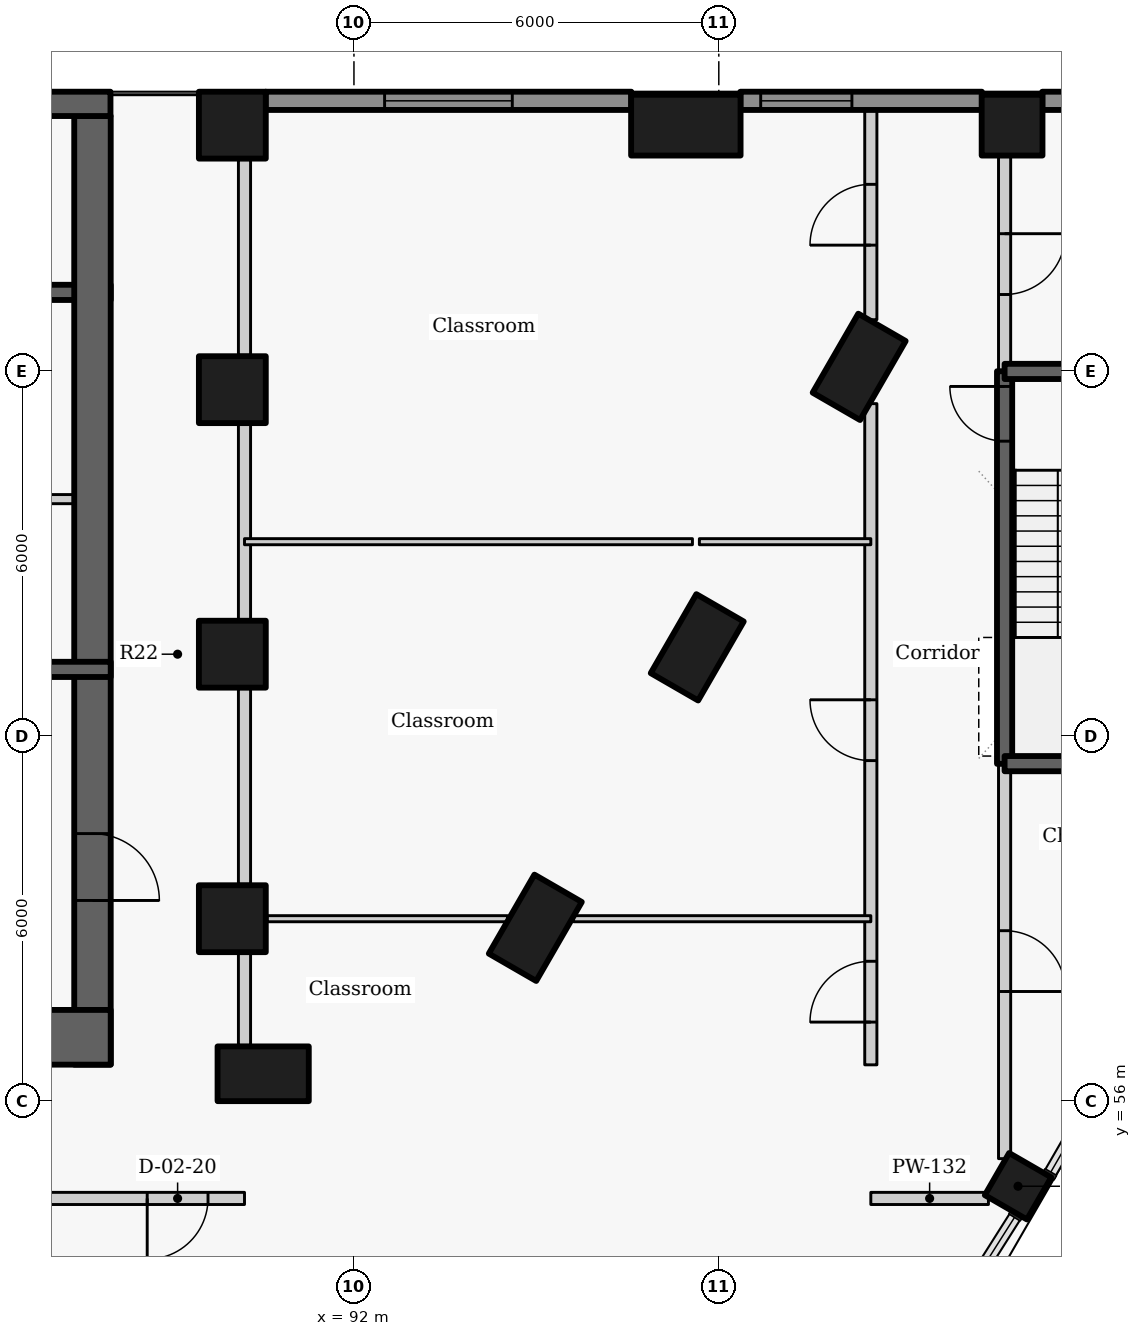
"""IFC4 building model, lengths in metres.
Left out: names, types, materials, properties, quantities, classifications, styles, units other than length and angle.
Written with IfcOpenShell. Run it as: python <this file> out.ifc"""

import sys

from ifc_helpers import new_model, si_unit, direction, frame, frame_2d, origin, origin_2d, place, context, subcontext, project, spatial, rectangle, extrude, element, fill, save


model = new_model("IFC4")
c1 = context("Model", 3, precision=1e-05, world=origin(), true_north=direction((0.0, 1.0)))
c2 = subcontext(c1, "Body", "Model", "MODEL_VIEW")
j1 = project(units=[si_unit("LENGTHUNIT", "METRE"), si_unit("PLANEANGLEUNIT", "RADIAN")], contexts=[c1])
p1 = place(None, origin())
s1 = spatial("IfcSite", under=j1, at=p1, CompositionType="ELEMENT")
p2 = place(p1, origin())
s2 = spatial("IfcBuilding", under=s1, at=p2, CompositionType="ELEMENT")
p3 = place(p2, frame((0.0, 0.0, 19.8)))
s3 = spatial("IfcBuildingStorey", under=s2, at=p3, CompositionType="ELEMENT", Elevation=19.8)
for number, where, z_axis, x_axis in (
    (1, (90.507, 56.45, 0.0), (0.0, 0.0, 1.0), (1.0, 0.0, 0.0)),
    (2, (94.982, 58.851, 0.0), (0.0, 0.0, 1.0), (0.5, 0.866, 0.0)),
    (3, (97.646, 63.463, 0.0), (0.0, 0.0, 1.0), (0.5, 0.866, 0.0)),
    (4, (100.308, 68.075, 0.0), (0.0, 0.0, 1.0), (0.5, 0.866, 0.0)),
):
    element("IfcColumn", number, at=place(p3, frame(where, z_axis=z_axis, x_axis=x_axis)), inside=s3, PredefinedType="COLUMN", context=c2, shape_type="SweptSolid", body=[
        extrude(rectangle(XDim=1.5, YDim=0.9, at=origin_2d()), origin(), (0.0, 0.0, 1.0), 4.2),
    ])
for number, where, z_axis, x_axis in (
    (5, (90.0, 59.0, 0.0), (0.0, 0.0, 1.0), (0.0, 1.0, 0.0)),
    (6, (90.0, 63.35, 0.0), (0.0, 0.0, 1.0), (0.0, 1.0, 0.0)),
    (7, (90.0, 67.7, 0.0), (0.0, 0.0, 1.0), (0.0, 1.0, 0.0)),
    (8, (90.0, 72.05, 0.0), (0.0, 0.0, 1.0), (0.0, 1.0, 0.0)),
):
    element("IfcColumn", number, at=place(p3, frame(where, z_axis=z_axis, x_axis=x_axis)), inside=s3, PredefinedType="COLUMN", context=c2, shape_type="SweptSolid", body=[
        extrude(rectangle(XDim=1.1, YDim=1.1, at=origin_2d()), origin(), (0.0, 0.0, 1.0), 4.2),
    ])
p4 = place(p3, frame((102.921, 54.6, 0.0), z_axis=(0.0, 0.0, 1.0), x_axis=(0.5, 0.866025403784, 0.0)))
e9 = element("IfcColumn", 9, at=p4, inside=s3, PredefinedType="COLUMN", context=c2, shape_type="SweptSolid", body=[
    extrude(rectangle(XDim=0.8, YDim=0.8, at=origin_2d()), origin(), (0.0, 0.0, 1.0), 4.2),
])
p5 = place(p3, frame((97.458, 72.05, 0.0), z_axis=(0.0, 0.0, 1.0), x_axis=(1.0, 0.0, 0.0)))
e10 = element("IfcColumn", 10, at=p5, inside=s3, PredefinedType="COLUMN", context=c2, shape_type="SweptSolid", body=[
    extrude(rectangle(XDim=1.8, YDim=1.0, at=origin_2d()), origin(), (0.0, 0.0, 1.0), 4.2),
])
p6 = place(p3, frame((102.823, 72.05, 0.0), z_axis=(0.0, 0.0, 1.0), x_axis=(1.0, 0.0, 0.0)))
e11 = element("IfcColumn", 11, at=p6, inside=s3, PredefinedType="COLUMN", context=c2, shape_type="SweptSolid", body=[
    extrude(rectangle(XDim=1.0, YDim=1.0, at=origin_2d()), origin(), (0.0, 0.0, 1.0), 4.2),
])
p7 = place(p3, frame((107.413, 72.45, 0.0), z_axis=(0.0, 0.0, 1.0), x_axis=(-1.0, 0.0, 0.0)))
e12 = element("IfcWall", 12, at=p7, inside=s3, PredefinedType="SOLIDWALL", context=c2, shape_type="SweptSolid", body=[
    extrude(rectangle(XDim=4.094, YDim=0.3, at=frame_2d((2.047, 0.0))), origin(), (0.0, 0.0, 1.0), 3.0),
])
p8 = place(p7, frame((0.997, 0.0, 0.9)))
e13 = element("IfcOpeningElement", 13, at=p8, cuts=e12, PredefinedType="OPENING", context=c2, shape_type="SweptSolid", body=[
    extrude(rectangle(XDim=2.1, YDim=2.05, at=frame_2d((1.05, 1.025))), frame((0.0, 0.16, 0.0), z_axis=(0.0, -1.0, 0.0), x_axis=(1.0, 0.0, 0.0)), (0.0, 0.0, 1.0), 0.32),
])
p9 = place(p3, frame((102.327, 72.45, 0.0), z_axis=(0.0, 0.0, 1.0), x_axis=(-1.0, 0.0, 0.0)))
e14 = element("IfcWall", 14, at=p9, inside=s3, PredefinedType="SOLIDWALL", context=c2, shape_type="SweptSolid", body=[
    extrude(rectangle(XDim=3.973, YDim=0.3, at=frame_2d((1.986, 0.0))), origin(), (0.0, 0.0, 1.0), 3.0),
])
p10 = place(p9, frame((2.138, 0.0, 0.9)))
e15 = element("IfcOpeningElement", 15, at=p10, cuts=e14, PredefinedType="OPENING", context=c2, shape_type="SweptSolid", body=[
    extrude(rectangle(XDim=1.5, YDim=2.05, at=frame_2d((0.75, 1.025))), frame((0.0, 0.16, 0.0), z_axis=(0.0, -1.0, 0.0), x_axis=(1.0, 0.0, 0.0)), (0.0, 0.0, 1.0), 0.32),
])
p11 = place(p3, frame((96.562, 72.45, 0.0), z_axis=(0.0, 0.0, 1.0), x_axis=(-1.0, 0.0, 0.0)))
e16 = element("IfcWall", 16, at=p11, inside=s3, PredefinedType="SOLIDWALL", context=c2, shape_type="SweptSolid", body=[
    extrude(rectangle(XDim=6.016, YDim=0.3, at=frame_2d((3.008, 0.0))), origin(), (0.0, 0.0, 1.0), 3.0),
])
p12 = place(p11, frame((1.958, 0.0, 0.9)))
e17 = element("IfcOpeningElement", 17, at=p12, cuts=e16, PredefinedType="OPENING", context=c2, shape_type="SweptSolid", body=[
    extrude(rectangle(XDim=2.1, YDim=2.05, at=frame_2d((1.05, 1.025))), frame((0.0, 0.16, 0.0), z_axis=(0.0, -1.0, 0.0), x_axis=(1.0, 0.0, 0.0)), (0.0, 0.0, 1.0), 0.32),
])
p13 = place(p3, frame((85.4, 69.3, -0.3), z_axis=(0.0, 0.0, 1.0), x_axis=(1.0, 0.0, 0.0)))
e18 = element("IfcWall", 18, at=p13, inside=s3, PredefinedType="SHEAR", context=c2, shape_type="SweptSolid", body=[
    extrude(rectangle(XDim=2.6, YDim=0.25, at=frame_2d((1.3, 0.0))), origin(), (0.0, 0.0, 1.0), 4.2),
])
p14 = place(p13, frame((0.525, 0.0, 0.3)))
e19 = element("IfcOpeningElement", 19, at=p14, cuts=e18, PredefinedType="OPENING", context=c2, shape_type="SweptSolid", body=[
    extrude(rectangle(XDim=0.9, YDim=2.1, at=frame_2d((0.45, 1.05))), frame((0.0, 0.135, 0.0), z_axis=(0.0, -1.0, 0.0), x_axis=(1.0, 0.0, 0.0)), (0.0, 0.0, 1.0), 0.27),
])
p15 = place(p3, frame((87.7, 72.2, -0.3), z_axis=(0.0, 0.0, 1.0), x_axis=(0.0, -1.0, 0.0)))
e20 = element("IfcWall", 20, at=p15, inside=s3, PredefinedType="SHEAR", context=c2, shape_type="SweptSolid", body=[
    extrude(rectangle(XDim=15.6, YDim=0.6, at=frame_2d((7.8, 0.0))), origin(), (0.0, 0.0, 1.0), 4.2),
])
p16 = place(p15, frame((11.8, 0.0, 0.3)))
e21 = element("IfcOpeningElement", 21, at=p16, cuts=e20, PredefinedType="OPENING", context=c2, shape_type="SweptSolid", body=[
    extrude(rectangle(XDim=1.1, YDim=2.1, at=frame_2d((0.55, 1.05))), frame((0.0, 0.31, 0.0), z_axis=(0.0, -1.0, 0.0), x_axis=(1.0, 0.0, 0.0)), (0.0, 0.0, 1.0), 0.62),
])
p17 = place(p3, frame((88.0, 65.9, 0.0), z_axis=(0.0, 0.0, 1.0), x_axis=(-1.0, 0.0, 0.0)))
e22 = element("IfcWall", 22, at=p17, inside=s3, PredefinedType="PARTITIONING", context=c2, shape_type="SweptSolid", body=[
    extrude(rectangle(XDim=2.603, YDim=0.15, at=frame_2d((1.302, 0.0))), origin(), (0.0, 0.0, 1.0), 3.9),
])
p18 = place(p17, frame((1.175, 0.0, 0.0)))
e23 = element("IfcOpeningElement", 23, at=p18, cuts=e22, PredefinedType="OPENING", context=c2, shape_type="SweptSolid", body=[
    extrude(rectangle(XDim=0.9, YDim=2.1, at=frame_2d((0.45, 1.05))), frame((0.0, 0.085, 0.0), z_axis=(0.0, -1.0, 0.0), x_axis=(1.0, 0.0, 0.0)), (0.0, 0.0, 1.0), 0.17),
])
p19 = place(p3, frame((80.0, 63.1, -0.3), z_axis=(0.0, 0.0, 1.0), x_axis=(1.0, 0.0, 0.0)))
e24 = element("IfcWall", 24, at=p19, inside=s3, PredefinedType="SHEAR", context=c2, shape_type="SweptSolid", body=[
    extrude(rectangle(XDim=8.0, YDim=0.25, at=frame_2d((4.0, 0.0))), origin(), (0.0, 0.0, 1.0), 4.2),
])
p20 = place(p19, frame((3.849, 0.0, 0.3)))
e25 = element("IfcOpeningElement", 25, at=p20, cuts=e24, PredefinedType="OPENING", context=c2, shape_type="SweptSolid", body=[
    extrude(rectangle(XDim=1.1, YDim=2.1, at=frame_2d((0.55, 1.05))), frame((0.0, 0.135, 0.0), z_axis=(0.0, -1.0, 0.0), x_axis=(1.0, 0.0, 0.0)), (0.0, 0.0, 1.0), 0.27),
])
p21 = place(p3, frame((88.0, 57.05, -0.3), z_axis=(0.0, 0.0, 1.0), x_axis=(-1.0, 0.0, 0.0)))
e26 = element("IfcWall", 26, at=p21, inside=s3, PredefinedType="SHEAR", context=c2, shape_type="SweptSolid", body=[
    extrude(rectangle(XDim=4.6, YDim=0.9, at=frame_2d((2.3, 0.0))), origin(), (0.0, 0.0, 1.0), 4.2),
])
p22 = place(p21, frame((1.752, 0.0, 0.3)))
e27 = element("IfcOpeningElement", 27, at=p22, cuts=e26, PredefinedType="OPENING", context=c2, shape_type="SweptSolid", body=[
    extrude(rectangle(XDim=1.1, YDim=2.1, at=frame_2d((0.55, 1.05))), frame((0.0, 0.46, 0.0), z_axis=(0.0, -1.0, 0.0), x_axis=(1.0, 0.0, 0.0)), (0.0, 0.0, 1.0), 0.92),
])
p23 = place(p3, frame((102.7, 61.547, -0.3), z_axis=(0.0, 0.0, 1.0), x_axis=(0.0, 1.0, 0.0)))
e28 = element("IfcWall", 28, at=p23, inside=s3, PredefinedType="SHEAR", context=c2, shape_type="SweptSolid", body=[
    extrude(rectangle(XDim=6.456, YDim=0.25, at=frame_2d((3.228, 0.0))), origin(), (0.0, 0.0, 1.0), 4.2),
])
p24 = place(p23, frame((5.306, 0.0, 0.3)))
e29 = element("IfcOpeningElement", 29, at=p24, cuts=e28, PredefinedType="OPENING", context=c2, shape_type="SweptSolid", body=[
    extrude(rectangle(XDim=0.9, YDim=2.1, at=frame_2d((0.45, 1.05))), frame((0.0, 0.135, 0.0), z_axis=(0.0, -1.0, 0.0), x_axis=(1.0, 0.0, 0.0)), (0.0, 0.0, 1.0), 0.27),
])
p25 = place(p3, frame((102.7, 61.553, 0.0), z_axis=(0.0, 0.0, 1.0), x_axis=(0.0, -1.0, 0.0)))
e30 = element("IfcWall", 30, at=p25, inside=s3, PredefinedType="PARTITIONING", context=c2, shape_type="SweptSolid", body=[
    extrude(rectangle(XDim=6.499, YDim=0.2, at=frame_2d((3.249, 0.0))), origin(), (0.0, 0.0, 1.0), 3.9),
])
p26 = place(p25, frame((2.75, 0.0, 0.0)))
e31 = element("IfcOpeningElement", 31, at=p26, cuts=e30, PredefinedType="OPENING", context=c2, shape_type="SweptSolid", body=[
    extrude(rectangle(XDim=1.0, YDim=2.1, at=frame_2d((0.5, 1.05))), frame((0.0, 0.11, 0.0), z_axis=(0.0, -1.0, 0.0), x_axis=(1.0, 0.0, 0.0)), (0.0, 0.0, 1.0), 0.22),
])
p27 = place(p3, frame((102.7, 71.533, 0.0), z_axis=(0.0, 0.0, 1.0), x_axis=(0.0, -1.0, 0.0)))
e32 = element("IfcWall", 32, at=p27, inside=s3, PredefinedType="PARTITIONING", context=c2, shape_type="SweptSolid", body=[
    extrude(rectangle(XDim=3.536, YDim=0.2, at=frame_2d((1.768, 0.0))), origin(), (0.0, 0.0, 1.0), 3.9),
])
p28 = place(p27, frame((1.268, 0.0, 0.0)))
e33 = element("IfcOpeningElement", 33, at=p28, cuts=e32, PredefinedType="OPENING", context=c2, shape_type="SweptSolid", body=[
    extrude(rectangle(XDim=1.0, YDim=2.1, at=frame_2d((0.5, 1.05))), frame((0.0, 0.11, 0.0), z_axis=(0.0, -1.0, 0.0), x_axis=(1.0, 0.0, 0.0)), (0.0, 0.0, 1.0), 0.22),
])
p29 = place(p3, frame((100.5, 56.597, 0.0), z_axis=(0.0, 0.0, 1.0), x_axis=(0.0, 1.0, 0.0)))
e34 = element("IfcWall", 34, at=p29, inside=s3, PredefinedType="PARTITIONING", context=c2, shape_type="SweptSolid", body=[
    extrude(rectangle(XDim=10.873, YDim=0.2, at=frame_2d((5.437, 0.0))), origin(), (0.0, 0.0, 1.0), 3.9),
])
p30 = place(p29, frame((5.003, 0.0, 0.0)))
e35 = element("IfcOpeningElement", 35, at=p30, cuts=e34, PredefinedType="OPENING", context=c2, shape_type="SweptSolid", body=[
    extrude(rectangle(XDim=1.0, YDim=2.1, at=frame_2d((0.5, 1.05))), frame((0.0, 0.11, 0.0), z_axis=(0.0, -1.0, 0.0), x_axis=(1.0, 0.0, 0.0)), (0.0, 0.0, 1.0), 0.22),
])
p31 = place(p29, frame((0.703, 0.0, 0.0)))
e36 = element("IfcOpeningElement", 36, at=p31, cuts=e34, PredefinedType="OPENING", context=c2, shape_type="SweptSolid", body=[
    extrude(rectangle(XDim=1.0, YDim=2.1, at=frame_2d((0.5, 1.05))), frame((0.0, 0.11, 0.0), z_axis=(0.0, -1.0, 0.0), x_axis=(1.0, 0.0, 0.0)), (0.0, 0.0, 1.0), 0.22),
])
p32 = place(p3, frame((100.5, 68.851, 0.0), z_axis=(0.0, 0.0, 1.0), x_axis=(0.0, 1.0, 0.0)))
e37 = element("IfcWall", 37, at=p32, inside=s3, PredefinedType="PARTITIONING", context=c2, shape_type="SweptSolid", body=[
    extrude(rectangle(XDim=3.449, YDim=0.2, at=frame_2d((1.725, 0.0))), origin(), (0.0, 0.0, 1.0), 3.13),
])
p33 = place(p32, frame((1.226, 0.0, 0.0)))
e38 = element("IfcOpeningElement", 38, at=p33, cuts=e37, PredefinedType="OPENING", context=c2, shape_type="SweptSolid", body=[
    extrude(rectangle(XDim=1.0, YDim=2.1, at=frame_2d((0.5, 1.05))), frame((0.0, 0.11, 0.0), z_axis=(0.0, -1.0, 0.0), x_axis=(1.0, 0.0, 0.0)), (0.0, 0.0, 1.0), 0.22),
])
p34 = place(p3, frame((90.2, 56.917, 0.0), z_axis=(0.0, 0.0, 1.0), x_axis=(0.0, 1.0, 0.0)))
e39 = element("IfcWall", 39, at=p34, inside=s3, PredefinedType="PARTITIONING", context=c2, shape_type="SweptSolid", body=[
    extrude(rectangle(XDim=1.516, YDim=0.2, at=frame_2d((0.758, 0.0))), origin(), (0.0, 0.0, 1.0), 3.9),
])
for number, where, z_axis, x_axis in (
    (40, (90.2, 59.567, 0.0), (0.0, 0.0, 1.0), (0.0, 1.0, 0.0)),
    (41, (90.2, 63.917, 0.0), (0.0, 0.0, 1.0), (0.0, 1.0, 0.0)),
):
    element("IfcWall", number, at=place(p3, frame(where, z_axis=z_axis, x_axis=x_axis)), inside=s3, PredefinedType="PARTITIONING", context=c2, shape_type="SweptSolid", body=[
        extrude(rectangle(XDim=3.216, YDim=0.2, at=frame_2d((1.608, 0.0))), origin(), (0.0, 0.0, 1.0), 3.13),
    ])
p35 = place(p3, frame((90.2, 68.267, 0.0), z_axis=(0.0, 0.0, 1.0), x_axis=(0.0, 1.0, 0.0)))
e42 = element("IfcWall", 42, at=p35, inside=s3, PredefinedType="PARTITIONING", context=c2, shape_type="SweptSolid", body=[
    extrude(rectangle(XDim=3.216, YDim=0.2, at=frame_2d((1.608, 0.0))), origin(), (0.0, 0.0, 1.0), 3.13),
])
p36 = place(p3, frame((90.2, 54.4, 0.0), z_axis=(0.0, 0.0, 1.0), x_axis=(-1.0, 0.0, 0.0)))
e43 = element("IfcWall", 43, at=p36, inside=s3, PredefinedType="PARTITIONING", context=c2, shape_type="SweptSolid", body=[
    extrude(rectangle(XDim=20.4, YDim=0.2, at=frame_2d((10.2, 0.0))), origin(), (0.0, 0.0, 1.0), 3.9),
])
p37 = place(p36, frame((18.8, 0.0, 0.0)))
e44 = element("IfcOpeningElement", 44, at=p37, cuts=e43, PredefinedType="OPENING", context=c2, shape_type="SweptSolid", body=[
    extrude(rectangle(XDim=1.0, YDim=2.1, at=frame_2d((0.5, 1.05))), frame((0.0, 0.11, 0.0), z_axis=(0.0, -1.0, 0.0), x_axis=(1.0, 0.0, 0.0)), (0.0, 0.0, 1.0), 0.22),
])
p38 = place(p36, frame((0.6, 0.0, 0.0)))
e45 = element("IfcOpeningElement", 45, at=p38, cuts=e43, PredefinedType="OPENING", context=c2, shape_type="SweptSolid", body=[
    extrude(rectangle(XDim=1.0, YDim=2.1, at=frame_2d((0.5, 1.05))), frame((0.0, 0.11, 0.0), z_axis=(0.0, -1.0, 0.0), x_axis=(1.0, 0.0, 0.0)), (0.0, 0.0, 1.0), 0.22),
])
p39 = place(p36, frame((10.1, 0.0, 0.0)))
e46 = element("IfcOpeningElement", 46, at=p39, cuts=e43, PredefinedType="OPENING", context=c2, shape_type="SweptSolid", body=[
    extrude(rectangle(XDim=1.0, YDim=2.1, at=frame_2d((0.5, 1.05))), frame((0.0, 0.11, 0.0), z_axis=(0.0, -1.0, 0.0), x_axis=(1.0, 0.0, 0.0)), (0.0, 0.0, 1.0), 0.22),
])
p40 = place(p3, frame((100.5, 54.4, 0.0), z_axis=(0.0, 0.0, 1.0), x_axis=(1.0, 0.0, 0.0)))
e47 = element("IfcWall", 47, at=p40, inside=s3, PredefinedType="PARTITIONING", context=c2, shape_type="SweptSolid", body=[
    extrude(rectangle(XDim=1.934, YDim=0.2, at=frame_2d((0.967, 0.0))), origin(), (0.0, 0.0, 1.0), 3.9),
])
for number, where, z_axis, x_axis in (
    (48, (102.7, 68.0, -0.3), (0.0, 0.0, 1.0), (1.0, 0.0, 0.0)),
    (49, (102.7, 61.55, -0.3), (0.0, 0.0, 1.0), (1.0, 0.0, 0.0)),
):
    element("IfcWall", number, at=place(p3, frame(where, z_axis=z_axis, x_axis=x_axis)), inside=s3, PredefinedType="SHEAR", context=c2, shape_type="SweptSolid", body=[
        extrude(rectangle(XDim=3.45, YDim=0.25, at=frame_2d((1.725, 0.0))), origin(), (0.0, 0.0, 1.0), 4.2),
    ])
p41 = place(p3, frame((90.2, 65.2, 0.0), z_axis=(0.0, 0.0, 1.0), x_axis=(1.0, 0.0, 0.0)))
e50 = element("IfcWall", 50, at=p41, inside=s3, PredefinedType="PARTITIONING", context=c2, shape_type="SweptSolid", body=[
    extrude(rectangle(XDim=7.366, YDim=0.1, at=frame_2d((3.683, 0.0))), origin(), (0.0, 0.0, 1.0), 3.9),
])
p42 = place(p3, frame((97.68, 65.2, 0.0), z_axis=(0.0, 0.0, 1.0), x_axis=(1.0, 0.0, 0.0)))
e51 = element("IfcWall", 51, at=p42, inside=s3, PredefinedType="PARTITIONING", context=c2, shape_type="SweptSolid", body=[
    extrude(rectangle(XDim=2.82, YDim=0.1, at=frame_2d((1.41, 0.0))), origin(), (0.0, 0.0, 1.0), 2.98),
])
p43 = place(p3, frame((90.57, 59.0, 0.0), z_axis=(0.0, 0.0, 1.0), x_axis=(1.0, 0.0, 0.0)))
e52 = element("IfcWall", 52, at=p43, inside=s3, PredefinedType="PARTITIONING", context=c2, shape_type="SweptSolid", body=[
    extrude(rectangle(XDim=3.956, YDim=0.1, at=frame_2d((1.978, 0.0))), origin(), (0.0, 0.0, 1.0), 3.9),
])
p44 = place(p3, frame((95.612, 59.0, 0.0), z_axis=(0.0, 0.0, 1.0), x_axis=(1.0, 0.0, 0.0)))
e53 = element("IfcWall", 53, at=p44, inside=s3, PredefinedType="PARTITIONING", context=c2, shape_type="SweptSolid", body=[
    extrude(rectangle(XDim=4.888, YDim=0.1, at=frame_2d((2.444, 0.0))), origin(), (0.0, 0.0, 1.0), 3.9),
])
p45 = place(p3, frame((72.004, 72.4, -0.3), z_axis=(0.0, 0.0, 1.0), x_axis=(1.0, 0.0, 0.0)))
e54 = element("IfcWall", 54, at=p45, inside=s3, PredefinedType="SHEAR", context=c2, shape_type="SweptSolid", body=[
    extrude(rectangle(XDim=15.992, YDim=0.4, at=frame_2d((7.996, 0.0))), origin(), (0.0, 0.0, 1.0), 4.2),
])
p46 = place(p10, origin())
e55 = element("IfcWindow", 55, at=p46, inside=s3, PartitioningType="SINGLE_PANEL", PredefinedType="WINDOW", context=c2, shape_type="SweptSolid", body=[
    extrude(rectangle(XDim=1.5, YDim=2.05, at=frame_2d((0.75, 1.025))), frame((0.0, 0.03, 0.0), z_axis=(0.0, -1.0, 0.0), x_axis=(1.0, 0.0, 0.0)), (0.0, 0.0, 1.0), 0.06),
])
fill(e15, e55)
p47 = place(p12, origin())
e56 = element("IfcWindow", 56, at=p47, inside=s3, PartitioningType="SINGLE_PANEL", PredefinedType="WINDOW", context=c2, shape_type="SweptSolid", body=[
    extrude(rectangle(XDim=2.1, YDim=2.05, at=frame_2d((1.05, 1.025))), frame((0.0, 0.03, 0.0), z_axis=(0.0, -1.0, 0.0), x_axis=(1.0, 0.0, 0.0)), (0.0, 0.0, 1.0), 0.06),
])
fill(e17, e56)
p48 = place(p24, origin())
e57 = element("IfcDoor", 57, at=p48, inside=s3, OperationType="SINGLE_SWING_RIGHT", PredefinedType="DOOR", context=c2, shape_type="SweptSolid", body=[
    extrude(rectangle(XDim=0.9, YDim=2.1, at=frame_2d((0.45, 1.05))), frame((0.0, 0.025, 0.0), z_axis=(0.0, -1.0, 0.0), x_axis=(1.0, 0.0, 0.0)), (0.0, 0.0, 1.0), 0.05),
])
fill(e29, e57)
p49 = place(p28, origin())
e58 = element("IfcDoor", 58, at=p49, inside=s3, OperationType="SINGLE_SWING_LEFT", PredefinedType="DOOR", context=c2, shape_type="SweptSolid", body=[
    extrude(rectangle(XDim=1.0, YDim=2.1, at=frame_2d((0.5, 1.05))), frame((0.0, 0.025, 0.0), z_axis=(0.0, -1.0, 0.0), x_axis=(1.0, 0.0, 0.0)), (0.0, 0.0, 1.0), 0.05),
])
fill(e33, e58)
p50 = place(p26, origin())
e59 = element("IfcDoor", 59, at=p50, inside=s3, OperationType="SINGLE_SWING_RIGHT", PredefinedType="DOOR", context=c2, shape_type="SweptSolid", body=[
    extrude(rectangle(XDim=1.0, YDim=2.1, at=frame_2d((0.5, 1.05))), frame((0.0, 0.025, 0.0), z_axis=(0.0, -1.0, 0.0), x_axis=(1.0, 0.0, 0.0)), (0.0, 0.0, 1.0), 0.05),
])
fill(e31, e59)
p51 = place(p33, origin())
e60 = element("IfcDoor", 60, at=p51, inside=s3, OperationType="SINGLE_SWING_LEFT", PredefinedType="DOOR", context=c2, shape_type="SweptSolid", body=[
    extrude(rectangle(XDim=1.0, YDim=2.1, at=frame_2d((0.5, 1.05))), frame((0.0, 0.025, 0.0), z_axis=(0.0, -1.0, 0.0), x_axis=(1.0, 0.0, 0.0)), (0.0, 0.0, 1.0), 0.05),
])
fill(e38, e60)
p52 = place(p30, origin())
e61 = element("IfcDoor", 61, at=p52, inside=s3, OperationType="SINGLE_SWING_RIGHT", PredefinedType="DOOR", context=c2, shape_type="SweptSolid", body=[
    extrude(rectangle(XDim=1.0, YDim=2.1, at=frame_2d((0.5, 1.05))), frame((0.0, 0.025, 0.0), z_axis=(0.0, -1.0, 0.0), x_axis=(1.0, 0.0, 0.0)), (0.0, 0.0, 1.0), 0.05),
])
fill(e35, e61)
p53 = place(p31, origin())
e62 = element("IfcDoor", 62, at=p53, inside=s3, OperationType="SINGLE_SWING_LEFT", PredefinedType="DOOR", context=c2, shape_type="SweptSolid", body=[
    extrude(rectangle(XDim=1.0, YDim=2.1, at=frame_2d((0.5, 1.05))), frame((0.0, 0.025, 0.0), z_axis=(0.0, -1.0, 0.0), x_axis=(1.0, 0.0, 0.0)), (0.0, 0.0, 1.0), 0.05),
])
fill(e36, e62)
p54 = place(p38, origin())
e63 = element("IfcDoor", 63, at=p54, inside=s3, OperationType="SINGLE_SWING_RIGHT", PredefinedType="DOOR", context=c2, shape_type="SweptSolid", body=[
    extrude(rectangle(XDim=1.0, YDim=2.1, at=frame_2d((0.5, 1.05))), frame((0.0, 0.025, 0.0), z_axis=(0.0, -1.0, 0.0), x_axis=(1.0, 0.0, 0.0)), (0.0, 0.0, 1.0), 0.05),
])
fill(e45, e63)
p55 = place(p16, origin())
e64 = element("IfcDoor", 64, at=p55, inside=s3, OperationType="SINGLE_SWING_RIGHT", PredefinedType="DOOR", context=c2, shape_type="SweptSolid", body=[
    extrude(rectangle(XDim=1.1, YDim=2.1, at=frame_2d((0.55, 1.05))), frame((0.0, 0.025, 0.0), z_axis=(0.0, -1.0, 0.0), x_axis=(1.0, 0.0, 0.0)), (0.0, 0.0, 1.0), 0.05),
])
fill(e21, e64)
save(model, sys.argv[1])
